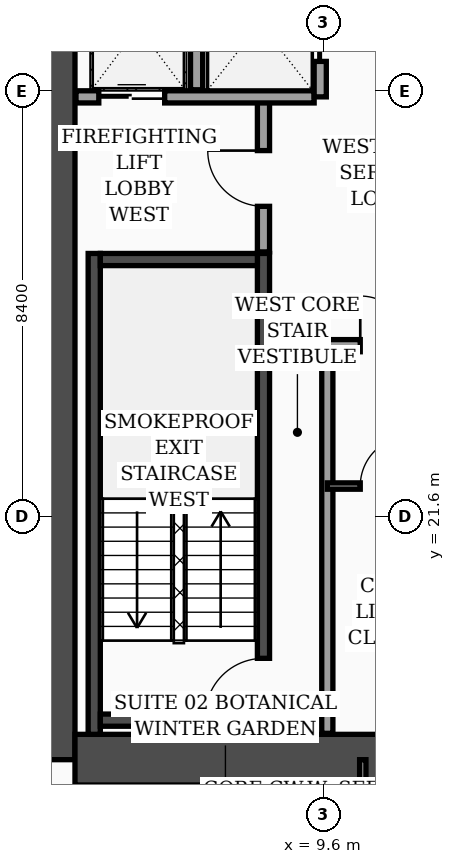
"""IFC4 building model, lengths in metres.
Left out: names, types, materials, properties, quantities, classifications, styles, units other than length and angle.
Written with IfcOpenShell. Run it as: python <this file> out.ifc"""

import sys

from ifc_helpers import new_model, si_unit, direction, frame, frame_2d, origin, place, context, subcontext, project, spatial, rectangle, extrude, element, fill, save


model = new_model("IFC4")
c1 = context("Model", 3, precision=1e-05, world=origin(), true_north=direction((0.0, 1.0)))
c2 = subcontext(c1, "Body", "Model", "MODEL_VIEW")
j1 = project(units=[si_unit("LENGTHUNIT", "METRE"), si_unit("PLANEANGLEUNIT", "RADIAN")], contexts=[c1])
p1 = place(None, origin())
s1 = spatial("IfcSite", under=j1, at=p1, CompositionType="ELEMENT")
p2 = place(p1, origin())
s2 = spatial("IfcBuilding", under=s1, at=p2, CompositionType="ELEMENT")
p3 = place(p2, frame((0.0, 0.0, 73.6)))
s3 = spatial("IfcBuildingStorey", under=s2, at=p3, CompositionType="ELEMENT", Elevation=73.6)
p4 = place(p3, frame((4.2, 16.8, 0.0), z_axis=(0.0, 0.0, 1.0), x_axis=(0.0, 1.0, 0.0)))
e1 = element("IfcWall", 1, at=p4, inside=s3, PredefinedType="SHEAR", context=c2, shape_type="SweptSolid", body=[
    extrude(rectangle(XDim=21.6, YDim=1.0, at=frame_2d((10.8, 0.0))), origin(), (0.0, 0.0, 1.0), 3.56),
])
p5 = place(p3, frame((4.7, 16.8, 0.0), z_axis=(0.0, 0.0, 1.0), x_axis=(1.0, 0.0, 0.0)))
e2 = element("IfcWall", 2, at=p5, inside=s3, PredefinedType="SHEAR", context=c2, shape_type="SweptSolid", body=[
    extrude(rectangle(XDim=9.8, YDim=1.0, at=frame_2d((4.9, 0.0))), origin(), (0.0, 0.0, 1.0), 3.56),
])
p6 = place(p3, frame((5.08, 17.3, 0.0), z_axis=(0.0, 0.0, 1.0), x_axis=(0.0, 1.0, 0.0)))
e3 = element("IfcWall", 3, at=p6, inside=s3, PredefinedType="SOLIDWALL", context=c2, shape_type="SweptSolid", body=[
    extrude(rectangle(XDim=9.49, YDim=0.24, at=frame_2d((4.745, 0.0))), origin(), (0.0, 0.0, 1.0), 3.56),
])
p7 = place(p3, frame((8.42, 17.3, 0.0), z_axis=(0.0, 0.0, 1.0), x_axis=(0.0, 1.0, 0.0)))
e4 = element("IfcWall", 4, at=p7, inside=s3, PredefinedType="SOLIDWALL", context=c2, shape_type="SweptSolid", body=[
    extrude(rectangle(XDim=9.49, YDim=0.24, at=frame_2d((4.745, 0.0))), origin(), (0.0, 0.0, 1.0), 3.56),
])
p8 = place(p7, frame((0.35, 0.0, 0.0)))
e5 = element("IfcOpeningElement", 5, at=p8, cuts=e4, PredefinedType="OPENING", context=c2, shape_type="SweptSolid", body=[
    extrude(rectangle(XDim=1.15, YDim=2.2, at=frame_2d((0.575, 1.1))), frame((0.0, 0.13, 0.0), z_axis=(0.0, -1.0, 0.0), x_axis=(1.0, 0.0, 0.0)), (0.0, 0.0, 1.0), 0.26),
])
for number, where, z_axis, x_axis in (
    (6, (5.2, 17.58, 0.0), (0.0, 0.0, 1.0), (1.0, 0.0, 0.0)),
    (7, (5.2, 26.67, 0.0), (0.0, 0.0, 1.0), (1.0, 0.0, 0.0)),
):
    element("IfcWall", number, at=place(p3, frame(where, z_axis=z_axis, x_axis=x_axis)), inside=s3, PredefinedType="SOLIDWALL", context=c2, shape_type="SweptSolid", body=[
        extrude(rectangle(XDim=3.1, YDim=0.24, at=frame_2d((1.55, 0.0))), origin(), (0.0, 0.0, 1.0), 3.56),
    ])
p9 = place(p3, frame((8.42, 26.82, 0.0), z_axis=(0.0, 0.0, 1.0), x_axis=(0.0, 1.0, 0.0)))
e8 = element("IfcWall", 8, at=p9, inside=s3, PredefinedType="SOLIDWALL", context=c2, shape_type="SweptSolid", body=[
    extrude(rectangle(XDim=3.0, YDim=0.24, at=frame_2d((1.5, 0.0))), origin(), (0.0, 0.0, 1.0), 3.56),
])
p10 = place(p9, frame((0.9, 0.0, 0.0)))
e9 = element("IfcOpeningElement", 9, at=p10, cuts=e8, PredefinedType="OPENING", context=c2, shape_type="SweptSolid", body=[
    extrude(rectangle(XDim=1.1, YDim=2.2, at=frame_2d((0.55, 1.1))), frame((0.0, 0.13, 0.0), z_axis=(0.0, -1.0, 0.0), x_axis=(1.0, 0.0, 0.0)), (0.0, 0.0, 1.0), 0.26),
])
p11 = place(p3, frame((4.72, 29.88, 0.0), z_axis=(0.0, 0.0, 1.0), x_axis=(1.0, 0.0, 0.0)))
e10 = element("IfcWall", 10, at=p11, inside=s3, PredefinedType="SOLIDWALL", context=c2, shape_type="SweptSolid", body=[
    extrude(rectangle(XDim=4.7, YDim=0.24, at=frame_2d((2.35, 0.0))), origin(), (0.0, 0.0, 1.0), 3.56),
])
p12 = place(p11, frame((0.45, 0.0, 0.0)))
e11 = element("IfcOpeningElement", 11, at=p12, cuts=e10, PredefinedType="OPENING", context=c2, shape_type="SweptSolid", body=[
    extrude(rectangle(XDim=1.3, YDim=2.35, at=frame_2d((0.65, 1.175))), frame((0.0, 0.13, 0.0), z_axis=(0.0, -1.0, 0.0), x_axis=(1.0, 0.0, 0.0)), (0.0, 0.0, 1.0), 0.26),
])
p13 = place(p3, frame((7.1, 30.02, 0.0), z_axis=(0.0, 0.0, 1.0), x_axis=(0.0, 1.0, 0.0)))
e12 = element("IfcWall", 12, at=p13, inside=s3, PredefinedType="SOLIDWALL", context=c2, shape_type="SweptSolid", body=[
    extrude(rectangle(XDim=2.63, YDim=0.24, at=frame_2d((1.315, 0.0))), origin(), (0.0, 0.0, 1.0), 3.56),
])
p14 = place(p3, frame((9.54, 29.88, 0.0), z_axis=(0.0, 0.0, 1.0), x_axis=(0.0, 1.0, 0.0)))
e13 = element("IfcWall", 13, at=p14, inside=s3, PredefinedType="SOLIDWALL", context=c2, shape_type="SweptSolid", body=[
    extrude(rectangle(XDim=2.9, YDim=0.24, at=frame_2d((1.45, 0.0))), origin(), (0.0, 0.0, 1.0), 3.56),
])
p15 = place(p14, frame((0.7, 0.0, 0.0)))
e14 = element("IfcOpeningElement", 14, at=p15, cuts=e13, PredefinedType="OPENING", context=c2, shape_type="SweptSolid", body=[
    extrude(rectangle(XDim=1.3, YDim=2.35, at=frame_2d((0.65, 1.175))), frame((0.0, 0.13, 0.0), z_axis=(0.0, -1.0, 0.0), x_axis=(1.0, 0.0, 0.0)), (0.0, 0.0, 1.0), 0.26),
])
p16 = place(p3, frame((9.68, 17.32, 0.0), z_axis=(0.0, 0.0, 1.0), x_axis=(0.0, 1.0, 0.0)))
e15 = element("IfcWall", 15, at=p16, inside=s3, PredefinedType="SOLIDWALL", context=c2, shape_type="SweptSolid", body=[
    extrude(rectangle(XDim=7.68, YDim=0.22, at=frame_2d((3.84, 0.0))), origin(), (0.0, 0.0, 1.0), 3.56),
])
p17 = place(p3, frame((9.68, 22.2, 0.0), z_axis=(0.0, 0.0, 1.0), x_axis=(1.0, 0.0, 0.0)))
e16 = element("IfcWall", 16, at=p17, inside=s3, PredefinedType="PARTITIONING", context=c2, shape_type="SweptSolid", body=[
    extrude(rectangle(XDim=2.47, YDim=0.125, at=frame_2d((1.235, 0.0))), origin(), (0.0, 0.0, 1.0), 3.56),
])
p18 = place(p17, frame((0.65, 0.0, 0.0)))
e17 = element("IfcOpeningElement", 17, at=p18, cuts=e16, PredefinedType="OPENING", context=c2, shape_type="SweptSolid", body=[
    extrude(rectangle(XDim=0.98, YDim=2.15, at=frame_2d((0.49, 1.075))), frame((0.0, 0.073, 0.0), z_axis=(0.0, -1.0, 0.0), x_axis=(1.0, 0.0, 0.0)), (0.0, 0.0, 1.0), 0.145),
])
p19 = place(p3, frame((9.68, 24.97, 0.0), z_axis=(0.0, 0.0, 1.0), x_axis=(1.0, 0.0, 0.0)))
e18 = element("IfcWall", 18, at=p19, inside=s3, PredefinedType="SOLIDWALL", context=c2, shape_type="SweptSolid", body=[
    extrude(rectangle(XDim=2.47, YDim=0.24, at=frame_2d((1.235, 0.0))), origin(), (0.0, 0.0, 1.0), 3.56),
])
p20 = place(p19, frame((0.65, 0.0, 0.0)))
e19 = element("IfcOpeningElement", 19, at=p20, cuts=e18, PredefinedType="OPENING", context=c2, shape_type="SweptSolid", body=[
    extrude(rectangle(XDim=0.98, YDim=2.15, at=frame_2d((0.49, 1.075))), frame((0.0, 0.13, 0.0), z_axis=(0.0, -1.0, 0.0), x_axis=(1.0, 0.0, 0.0)), (0.0, 0.0, 1.0), 0.26),
])
p21 = place(p3, frame((10.38, 14.75, 0.0), z_axis=(0.0, 0.0, 1.0), x_axis=(0.0, 1.0, 0.0)))
e20 = element("IfcWall", 20, at=p21, inside=s3, PredefinedType="PARTITIONING", context=c2, shape_type="SweptSolid", body=[
    extrude(rectangle(XDim=2.05, YDim=0.125, at=frame_2d((1.025, 0.0))), origin(), (0.0, 0.0, 1.0), 3.56),
])
p22 = place(p10, origin())
e21 = element("IfcDoor", 21, at=p22, inside=s3, OperationType="SINGLE_SWING_RIGHT", PredefinedType="DOOR", context=c2, shape_type="SweptSolid", body=[
    extrude(rectangle(XDim=1.1, YDim=2.2, at=frame_2d((0.55, 1.1))), frame((0.0, 0.025, 0.0), z_axis=(0.0, -1.0, 0.0), x_axis=(1.0, 0.0, 0.0)), (0.0, 0.0, 1.0), 0.05),
])
fill(e9, e21)
p23 = place(p12, origin())
e22 = element("IfcDoor", 22, at=p23, inside=s3, OperationType="DOUBLE_DOOR_SLIDING", PredefinedType="DOOR", context=c2, shape_type="SweptSolid", body=[
    extrude(rectangle(XDim=1.3, YDim=2.35, at=frame_2d((0.65, 1.175))), frame((0.0, 0.025, 0.0), z_axis=(0.0, -1.0, 0.0), x_axis=(1.0, 0.0, 0.0)), (0.0, 0.0, 1.0), 0.05),
])
fill(e11, e22)
p24 = place(p15, origin())
e23 = element("IfcDoor", 23, at=p24, inside=s3, OperationType="DOUBLE_DOOR_SLIDING", PredefinedType="DOOR", context=c2, shape_type="SweptSolid", body=[
    extrude(rectangle(XDim=1.3, YDim=2.35, at=frame_2d((0.65, 1.175))), frame((0.0, 0.025, 0.0), z_axis=(0.0, -1.0, 0.0), x_axis=(1.0, 0.0, 0.0)), (0.0, 0.0, 1.0), 0.05),
])
fill(e14, e23)
p25 = place(p18, origin())
e24 = element("IfcDoor", 24, at=p25, inside=s3, OperationType="SINGLE_SWING_RIGHT", PredefinedType="DOOR", context=c2, shape_type="SweptSolid", body=[
    extrude(rectangle(XDim=0.98, YDim=2.15, at=frame_2d((0.49, 1.075))), frame((0.0, 0.025, 0.0), z_axis=(0.0, -1.0, 0.0), x_axis=(1.0, 0.0, 0.0)), (0.0, 0.0, 1.0), 0.05),
])
fill(e17, e24)
p26 = place(p20, origin())
e25 = element("IfcDoor", 25, at=p26, inside=s3, OperationType="SINGLE_SWING_LEFT", PredefinedType="DOOR", context=c2, shape_type="SweptSolid", body=[
    extrude(rectangle(XDim=0.98, YDim=2.15, at=frame_2d((0.49, 1.075))), frame((0.0, 0.025, 0.0), z_axis=(0.0, -1.0, 0.0), x_axis=(1.0, 0.0, 0.0)), (0.0, 0.0, 1.0), 0.05),
])
fill(e19, e25)
p27 = place(p8, origin())
e26 = element("IfcDoor", 26, at=p27, inside=s3, OperationType="SINGLE_SWING_LEFT", PredefinedType="DOOR", context=c2, shape_type="SweptSolid", body=[
    extrude(rectangle(XDim=1.15, YDim=2.2, at=frame_2d((0.575, 1.1))), frame((0.0, 0.025, 0.0), z_axis=(0.0, -1.0, 0.0), x_axis=(1.0, 0.0, 0.0)), (0.0, 0.0, 1.0), 0.05),
])
fill(e5, e26)
save(model, sys.argv[1])
